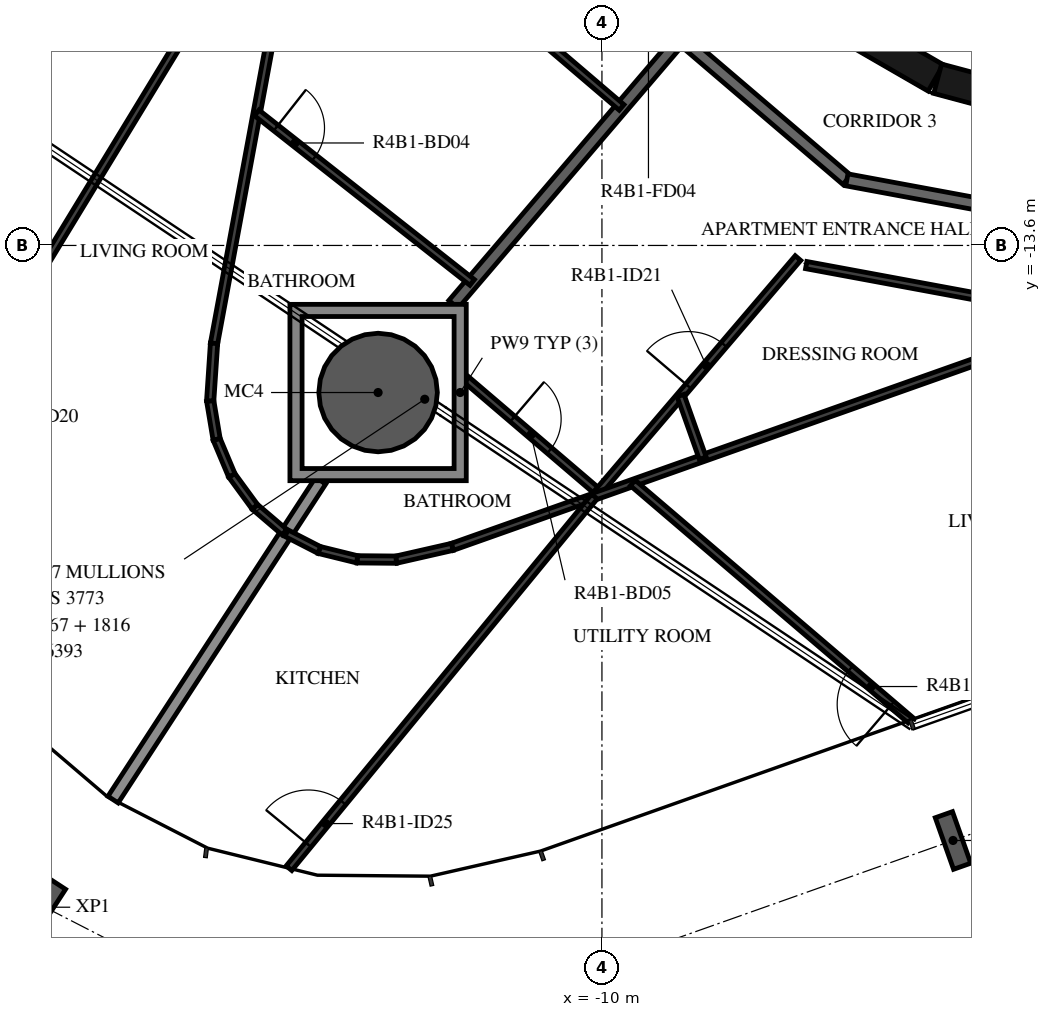
"""IFC4 building model, lengths in metres.
Left out: names, types, materials, properties, quantities, classifications, styles, units other than length and angle.
Written with IfcOpenShell. Run it as: python <this file> out.ifc"""

import sys

from ifc_helpers import new_model, si_unit, direction, frame, frame_2d, origin, origin_2d, place, context, subcontext, project, spatial, polyline, rectangle, hollow_circle, i_section, outline, extrude, element, fill, save


model = new_model("IFC4")
c1 = context("Model", 3, precision=1e-05, world=origin(), true_north=direction((0.0, 1.0)))
c2 = subcontext(c1, "Body", "Model", "MODEL_VIEW")
j1 = project(units=[si_unit("LENGTHUNIT", "METRE"), si_unit("PLANEANGLEUNIT", "RADIAN")], contexts=[c1])
p1 = place(None, origin())
s1 = spatial("IfcSite", under=j1, at=p1, CompositionType="ELEMENT")
p2 = place(p1, origin())
s2 = spatial("IfcBuilding", under=s1, at=p2, CompositionType="ELEMENT")
p3 = place(p2, frame((0.0, 0.0, 162.2)))
s3 = spatial("IfcBuildingStorey", under=s2, at=p3, CompositionType="ELEMENT", Elevation=162.2)
p4 = place(p3, frame((-13.681, -16.019, -0.38), z_axis=(0.0, 0.0, 1.0), x_axis=(1.0, 0.0, 0.0)))
e1 = element("IfcColumn", 1, at=p4, inside=s3, PredefinedType="COLUMN", context=c2, shape_type="SweptSolid", body=[
    extrude(hollow_circle(Radius=0.975, WallThickness=0.045, at=origin_2d()), origin(), (0.0, 0.0, 1.0), 3.5),
])
for number, where, z_axis, x_axis in (
    (2, (-19.192, -24.483, -0.38), (0.0, 0.0, 1.0), (-0.838, 0.546, 0.0)),
    (3, (-4.226, -23.385, -0.38), (0.0, 0.0, 1.0), (-0.943, -0.334, 0.0)),
):
    element("IfcColumn", number, at=place(p3, frame(where, z_axis=z_axis, x_axis=x_axis)), inside=s3, PredefinedType="COLUMN", context=c2, shape_type="SweptSolid", body=[
        extrude(i_section(OverallWidth=0.3, OverallDepth=0.9, WebThickness=0.019, FlangeThickness=0.035, FilletRadius=0.03, at=origin_2d()), origin(), (0.0, 0.0, 1.0), 3.5),
    ])
for number, where, z_axis, x_axis in (
    (4, (-7.137, -9.329, 0.0), (0.0, 0.0, 1.0), (0.866, -0.5, 0.0)),
    (5, (-4.479, -10.858, 0.0), (0.0, 0.0, 1.0), (0.966, -0.259, 0.0)),
):
    element("IfcWall", number, at=place(p3, frame(where, z_axis=z_axis, x_axis=x_axis)), inside=s3, PredefinedType="SHEAR", context=c2, shape_type="SweptSolid", body=[
        extrude(rectangle(XDim=3.033, YDim=0.5, at=frame_2d((1.516, 0.0))), origin(), (0.0, 0.0, 1.0), 3.12),
    ])
p5 = place(p3, frame((-11.433, -7.858, 0.0), z_axis=(0.0, 0.0, 1.0), x_axis=(0.760412154545, -0.649440801937, 0.0)))
e6 = element("IfcWall", 6, at=p5, inside=s3, PredefinedType="STANDARD", context=c2, shape_type="SweptSolid", body=[
    extrude(rectangle(XDim=7.181, YDim=0.2, at=frame_2d((3.59, 0.0))), origin(), (0.0, 0.0, 1.0), 3.12),
])
p6 = place(p5, frame((2.39, 0.0, 0.0)))
e7 = element("IfcOpeningElement", 7, at=p6, cuts=e6, PredefinedType="OPENING", context=c2, shape_type="SweptSolid", body=[
    extrude(rectangle(XDim=1.0, YDim=2.1, at=frame_2d((0.5, 1.05))), frame((0.0, 0.11, 0.0), z_axis=(0.0, -1.0, 0.0), x_axis=(1.0, 0.0, 0.0)), (0.0, 0.0, 1.0), 0.22),
])
p7 = place(p3, frame((-5.972, -12.521, 0.0), z_axis=(0.0, 0.0, 1.0), x_axis=(0.983256068163, -0.18222926335, 0.0)))
e8 = element("IfcWall", 8, at=p7, inside=s3, PredefinedType="STANDARD", context=c2, shape_type="SweptSolid", body=[
    extrude(rectangle(XDim=7.181, YDim=0.2, at=frame_2d((3.59, 0.0))), origin(), (0.0, 0.0, 1.0), 3.12),
])
p8 = place(p7, frame((4.6, 0.0, 0.0)))
e9 = element("IfcOpeningElement", 9, at=p8, cuts=e8, PredefinedType="OPENING", context=c2, shape_type="SweptSolid", body=[
    extrude(rectangle(XDim=1.0, YDim=2.1, at=frame_2d((0.5, 1.05))), frame((0.0, 0.11, 0.0), z_axis=(0.0, -1.0, 0.0), x_axis=(1.0, 0.0, 0.0)), (0.0, 0.0, 1.0), 0.22),
])
p9 = place(p3, frame((-12.441, -14.569, 0.0), z_axis=(0.0, 0.0, 1.0), x_axis=(0.649446013128, 0.760407703822, 0.0)))
e10 = element("IfcWall", 10, at=p9, inside=s3, PredefinedType="STANDARD", context=c2, shape_type="SweptSolid", body=[
    extrude(rectangle(XDim=5.758, YDim=0.2, at=frame_2d((2.879, 0.0))), origin(), (0.0, 0.0, 1.0), 3.12),
])
p10 = place(p3, frame((-18.04, -22.713, 0.0), z_axis=(0.0, 0.0, 1.0), x_axis=(0.545628572271, 0.838027124335, 0.0)))
e11 = element("IfcWall", 11, at=p10, inside=s3, PredefinedType="STANDARD", context=c2, shape_type="SweptSolid", body=[
    extrude(rectangle(XDim=6.258, YDim=0.2, at=frame_2d((3.129, 0.0))), origin(), (0.0, 0.0, 1.0), 2.73),
])
p11 = place(p3, frame((-12.713, -8.737, 0.0), z_axis=(0.0, 0.0, 1.0), x_axis=(0.760420863476, -0.649430604754, 0.0)))
e12 = element("IfcWall", 12, at=p11, inside=s3, PredefinedType="PARTITIONING", context=c2, shape_type="SweptSolid", body=[
    extrude(rectangle(XDim=3.992, YDim=0.12, at=frame_2d((1.996, 0.0))), origin(), (0.0, 0.0, 1.0), 3.12),
])
p12 = place(p3, frame((-20.849, -10.792, 0.0), z_axis=(0.0, 0.0, 1.0), x_axis=(0.848835001009, 0.528657867682, 0.0)))
e13 = element("IfcWall", 13, at=p12, inside=s3, PredefinedType="PARTITIONING", context=c2, shape_type="SweptSolid", body=[
    extrude(rectangle(XDim=6.778, YDim=0.12, at=frame_2d((3.389, 0.0))), origin(), (0.0, 0.0, 1.0), 3.12),
])
p13 = place(p3, frame((-21.461, -17.671, 0.0), z_axis=(0.0, 0.0, 1.0), x_axis=(0.519791999186, 0.854292852353, 0.0)))
e14 = element("IfcWall", 14, at=p13, inside=s3, PredefinedType="PARTITIONING", context=c2, shape_type="SweptSolid", body=[
    extrude(rectangle(XDim=12.247, YDim=0.12, at=frame_2d((6.124, 0.0))), origin(), (0.0, 0.0, 1.0), 3.12),
])
p14 = place(p13, frame((1.0, 0.0, 0.0)))
e15 = element("IfcOpeningElement", 15, at=p14, cuts=e14, PredefinedType="OPENING", context=c2, shape_type="SweptSolid", body=[
    extrude(rectangle(XDim=0.9, YDim=2.1, at=frame_2d((0.45, 1.05))), frame((0.0, 0.07, 0.0), z_axis=(0.0, -1.0, 0.0), x_axis=(1.0, 0.0, 0.0)), (0.0, 0.0, 1.0), 0.14),
])
p15 = place(p3, frame((-14.882, -7.133, 0.0), z_axis=(0.0, 0.0, 1.0), x_axis=(-0.182231858218, -0.983255587246, 0.0)))
e16 = element("IfcWall", 16, at=p15, inside=s3, PredefinedType="PARTITIONING", context=c2, shape_type="SweptSolid", body=[
    extrude(rectangle(XDim=8.215, YDim=0.12, at=frame_2d((4.107, 0.0))), origin(), (0.0, 0.0, 1.0), 3.12),
])
p16 = place(p15, frame((1.9, 0.0, 0.0)))
e17 = element("IfcOpeningElement", 17, at=p16, cuts=e16, PredefinedType="OPENING", context=c2, shape_type="SweptSolid", body=[
    extrude(rectangle(XDim=0.9, YDim=2.1, at=frame_2d((0.45, 1.05))), frame((0.0, 0.07, 0.0), z_axis=(0.0, -1.0, 0.0), x_axis=(1.0, 0.0, 0.0)), (0.0, 0.0, 1.0), 0.14),
])
p17 = place(p3, frame((-15.677, -11.42, 0.0), z_axis=(0.0, 0.0, 1.0), x_axis=(0.785821888461, -0.618452875824, 0.0)))
e18 = element("IfcWall", 18, at=p17, inside=s3, PredefinedType="PARTITIONING", context=c2, shape_type="SweptSolid", body=[
    extrude(rectangle(XDim=4.507, YDim=0.12, at=frame_2d((2.254, 0.0))), origin(), (0.0, 0.0, 1.0), 3.12),
])
p18 = place(p17, frame((0.4, 0.0, 0.0)))
e19 = element("IfcOpeningElement", 19, at=p18, cuts=e18, PredefinedType="OPENING", context=c2, shape_type="SweptSolid", body=[
    extrude(rectangle(XDim=0.8, YDim=2.1, at=frame_2d((0.4, 1.05))), frame((0.0, 0.07, 0.0), z_axis=(0.0, -1.0, 0.0), x_axis=(1.0, 0.0, 0.0)), (0.0, 0.0, 1.0), 0.14),
])
for number, where, z_axis, x_axis in (
    (20, (-15.22, -18.315, 0.0), (0.0, 0.0, 1.0), (-0.76, 0.65, 0.0)),
    (21, (-15.708, -17.898, 0.0), (0.0, 0.0, 1.0), (-0.59, 0.807, 0.0)),
):
    element("IfcWall", number, at=place(p3, frame(where, z_axis=z_axis, x_axis=x_axis)), inside=s3, PredefinedType="PARTITIONING", context=c2, shape_type="SweptSolid", body=[
        extrude(rectangle(XDim=0.642, YDim=0.12, at=frame_2d((0.321, 0.0))), origin(), (0.0, 0.0, 1.0), 3.12),
    ])
p19 = place(p3, frame((-16.087, -17.38, 0.0), z_axis=(0.0, 0.0, 1.0), x_axis=(-0.387852998664, 0.921721243884, 0.0)))
e22 = element("IfcWall", 22, at=p19, inside=s3, PredefinedType="PARTITIONING", context=c2, shape_type="SweptSolid", body=[
    extrude(rectangle(XDim=0.642, YDim=0.12, at=frame_2d((0.321, 0.0))), origin(), (0.0, 0.0, 1.0), 3.12),
])
p20 = place(p3, frame((-16.336, -16.788, 0.0), z_axis=(0.0, 0.0, 1.0), x_axis=(-0.165077433319, 0.986280609669, 0.0)))
e23 = element("IfcWall", 23, at=p20, inside=s3, PredefinedType="PARTITIONING", context=c2, shape_type="SweptSolid", body=[
    extrude(rectangle(XDim=0.642, YDim=0.12, at=frame_2d((0.321, 0.0))), origin(), (0.0, 0.0, 1.0), 3.12),
])
p21 = place(p3, frame((-16.442, -16.155, 0.0), z_axis=(0.0, 0.0, 1.0), x_axis=(0.066775688713, 0.997768012815, 0.0)))
e24 = element("IfcWall", 24, at=p21, inside=s3, PredefinedType="PARTITIONING", context=c2, shape_type="SweptSolid", body=[
    extrude(rectangle(XDim=0.947, YDim=0.12, at=frame_2d((0.474, 0.0))), origin(), (0.0, 0.0, 1.0), 3.12),
])
p22 = place(p3, frame((-12.231, -15.804, 0.0), z_axis=(0.0, 0.0, 1.0), x_axis=(0.760403625387, -0.649450788357, 0.0)))
e25 = element("IfcWall", 25, at=p22, inside=s3, PredefinedType="PARTITIONING", context=c2, shape_type="SweptSolid", body=[
    extrude(rectangle(XDim=2.852, YDim=0.12, at=frame_2d((1.426, 0.0))), origin(), (0.0, 0.0, 1.0), 3.12),
])
p23 = place(p22, frame((1.0, 0.0, 0.0)))
e26 = element("IfcOpeningElement", 26, at=p23, cuts=e25, PredefinedType="OPENING", context=c2, shape_type="SweptSolid", body=[
    extrude(rectangle(XDim=0.8, YDim=2.1, at=frame_2d((0.4, 1.05))), frame((0.0, 0.07, 0.0), z_axis=(0.0, -1.0, 0.0), x_axis=(1.0, 0.0, 0.0)), (0.0, 0.0, 1.0), 0.14),
])
p24 = place(p3, frame((-10.063, -17.656, 0.0), z_axis=(0.0, 0.0, 1.0), x_axis=(0.649451567172, 0.760402960211, 0.0)))
e27 = element("IfcWall", 27, at=p24, inside=s3, PredefinedType="PARTITIONING", context=c2, shape_type="SweptSolid", body=[
    extrude(rectangle(XDim=5.061, YDim=0.12, at=frame_2d((2.531, 0.0))), origin(), (0.0, 0.0, 1.0), 3.12),
])
p25 = place(p24, frame((2.288, 0.0, 0.0)))
e28 = element("IfcOpeningElement", 28, at=p25, cuts=e27, PredefinedType="OPENING", context=c2, shape_type="SweptSolid", body=[
    extrude(rectangle(XDim=0.9, YDim=2.1, at=frame_2d((0.45, 1.05))), frame((0.0, 0.07, 0.0), z_axis=(0.0, -1.0, 0.0), x_axis=(1.0, 0.0, 0.0)), (0.0, 0.0, 1.0), 0.14),
])
p26 = place(p3, frame((-6.641, -13.923, 0.0), z_axis=(0.0, 0.0, 1.0), x_axis=(0.983250157272, -0.182261153912, 0.0)))
e29 = element("IfcWall", 29, at=p26, inside=s3, PredefinedType="PARTITIONING", context=c2, shape_type="SweptSolid", body=[
    extrude(rectangle(XDim=7.985, YDim=0.12, at=frame_2d((3.992, 0.0))), origin(), (0.0, 0.0, 1.0), 3.12),
])
p27 = place(p26, frame((5.051, 0.0, 0.0)))
e30 = element("IfcOpeningElement", 30, at=p27, cuts=e29, PredefinedType="OPENING", context=c2, shape_type="SweptSolid", body=[
    extrude(rectangle(XDim=0.9, YDim=2.1, at=frame_2d((0.45, 1.05))), frame((0.0, 0.07, 0.0), z_axis=(0.0, -1.0, 0.0), x_axis=(1.0, 0.0, 0.0)), (0.0, 0.0, 1.0), 0.14),
])
p28 = place(p3, frame((-1.871, -14.807, 0.0), z_axis=(0.0, 0.0, 1.0), x_axis=(-0.942640759962, -0.333808923874, 0.0)))
e31 = element("IfcWall", 31, at=p28, inside=s3, PredefinedType="PARTITIONING", context=c2, shape_type="SweptSolid", body=[
    extrude(rectangle(XDim=11.234, YDim=0.12, at=frame_2d((5.617, 0.0))), origin(), (0.0, 0.0, 1.0), 3.12),
])
p29 = place(p3, frame((-12.461, -18.557, 0.0), z_axis=(0.0, 0.0, 1.0), x_axis=(-0.975039040601, -0.222033486897, 0.0)))
e32 = element("IfcWall", 32, at=p29, inside=s3, PredefinedType="PARTITIONING", context=c2, shape_type="SweptSolid", body=[
    extrude(rectangle(XDim=0.947, YDim=0.12, at=frame_2d((0.473, 0.0))), origin(), (0.0, 0.0, 1.0), 3.12),
])
p30 = place(p3, frame((-13.384, -18.767, 0.0), z_axis=(0.0, 0.0, 1.0), x_axis=(-0.999965015064, 0.008364726362, 0.0)))
e33 = element("IfcWall", 33, at=p30, inside=s3, PredefinedType="PARTITIONING", context=c2, shape_type="SweptSolid", body=[
    extrude(rectangle(XDim=0.642, YDim=0.12, at=frame_2d((0.321, 0.0))), origin(), (0.0, 0.0, 1.0), 3.12),
])
p31 = place(p3, frame((-14.026, -18.762, 0.0), z_axis=(0.0, 0.0, 1.0), x_axis=(-0.970964611728, 0.239223165208, 0.0)))
e34 = element("IfcWall", 34, at=p31, inside=s3, PredefinedType="PARTITIONING", context=c2, shape_type="SweptSolid", body=[
    extrude(rectangle(XDim=0.642, YDim=0.12, at=frame_2d((0.321, 0.0))), origin(), (0.0, 0.0, 1.0), 3.12),
])
p32 = place(p3, frame((-14.649, -18.608, 0.0), z_axis=(0.0, 0.0, 1.0), x_axis=(-0.889695551631, 0.456554296232, 0.0)))
e35 = element("IfcWall", 35, at=p32, inside=s3, PredefinedType="PARTITIONING", context=c2, shape_type="SweptSolid", body=[
    extrude(rectangle(XDim=0.605, YDim=0.12, at=frame_2d((0.302, 0.0))), origin(), (0.0, 0.0, 1.0), 3.12),
])
p33 = place(p3, frame((-15.146, -23.841, 0.0), z_axis=(0.0, 0.0, 1.0), x_axis=(0.634970373647, 0.772536487547, 0.0)))
e36 = element("IfcWall", 36, at=p33, inside=s3, PredefinedType="PARTITIONING", context=c2, shape_type="SweptSolid", body=[
    extrude(rectangle(XDim=7.912, YDim=0.12, at=frame_2d((3.956, 0.0))), origin(), (0.0, 0.0, 1.0), 3.12),
])
p34 = place(p33, frame((0.5, 0.0, 0.0)))
e37 = element("IfcOpeningElement", 37, at=p34, cuts=e36, PredefinedType="OPENING", context=c2, shape_type="SweptSolid", body=[
    extrude(rectangle(XDim=0.9, YDim=2.1, at=frame_2d((0.45, 1.05))), frame((0.0, 0.07, 0.0), z_axis=(0.0, -1.0, 0.0), x_axis=(1.0, 0.0, 0.0)), (0.0, 0.0, 1.0), 0.14),
])
p35 = place(p3, frame((-8.342, -17.098, 0.0), z_axis=(0.0, 0.0, 1.0), x_axis=(-0.333801646268, 0.942643337084, 0.0)))
e38 = element("IfcWall", 38, at=p35, inside=s3, PredefinedType="PARTITIONING", context=c2, shape_type="SweptSolid", body=[
    extrude(rectangle(XDim=1.093, YDim=0.12, at=frame_2d((0.546, 0.0))), origin(), (0.0, 0.0, 1.0), 3.12),
])
p36 = place(p3, frame((-4.927, -21.406, 0.0), z_axis=(0.0, 0.0, 1.0), x_axis=(-0.760409236665, 0.649444218385, 0.0)))
e39 = element("IfcWall", 39, at=p36, inside=s3, PredefinedType="PARTITIONING", context=c2, shape_type="SweptSolid", body=[
    extrude(rectangle(XDim=6.004, YDim=0.12, at=frame_2d((3.002, 0.0))), origin(), (0.0, 0.0, 1.0), 3.12),
])
p37 = place(p36, frame((0.4, 0.0, 0.0)))
e40 = element("IfcOpeningElement", 40, at=p37, cuts=e39, PredefinedType="OPENING", context=c2, shape_type="SweptSolid", body=[
    extrude(rectangle(XDim=0.9, YDim=2.1, at=frame_2d((0.45, 1.05))), frame((0.0, 0.07, 0.0), z_axis=(0.0, -1.0, 0.0), x_axis=(1.0, 0.0, 0.0)), (0.0, 0.0, 1.0), 0.14),
])
p38 = place(p3, origin())
e41 = element("IfcWall", 41, at=p38, inside=s3, PredefinedType="STANDARD", context=c2, shape_type="SweptSolid", body=[
    extrude(outline(polyline([(-12.231, -14.569), (-12.231, -17.469), (-15.131, -17.469), (-15.131, -14.569), (-12.231, -14.569)]), holes=[polyline([(-14.931, -17.269), (-12.431, -17.269), (-12.431, -14.769), (-14.931, -14.769), (-14.931, -17.269)])]), origin(), (0.0, 0.0, 1.0), 3.12),
])
p39 = place(p18, origin())
e42 = element("IfcDoor", 42, at=p39, inside=s3, OperationType="SINGLE_SWING_RIGHT", PredefinedType="DOOR", context=c2, shape_type="SweptSolid", body=[
    extrude(rectangle(XDim=0.8, YDim=2.1, at=frame_2d((0.4, 1.05))), frame((0.0, 0.025, 0.0), z_axis=(0.0, -1.0, 0.0), x_axis=(1.0, 0.0, 0.0)), (0.0, 0.0, 1.0), 0.05),
])
fill(e19, e42)
p40 = place(p23, origin())
e43 = element("IfcDoor", 43, at=p40, inside=s3, OperationType="SINGLE_SWING_LEFT", PredefinedType="DOOR", context=c2, shape_type="SweptSolid", body=[
    extrude(rectangle(XDim=0.8, YDim=2.1, at=frame_2d((0.4, 1.05))), frame((0.0, 0.025, 0.0), z_axis=(0.0, -1.0, 0.0), x_axis=(1.0, 0.0, 0.0)), (0.0, 0.0, 1.0), 0.05),
])
fill(e26, e43)
p41 = place(p25, origin())
e44 = element("IfcDoor", 44, at=p41, inside=s3, OperationType="SINGLE_SWING_LEFT", PredefinedType="DOOR", context=c2, shape_type="SweptSolid", body=[
    extrude(rectangle(XDim=0.9, YDim=2.1, at=frame_2d((0.45, 1.05))), frame((0.0, 0.025, 0.0), z_axis=(0.0, -1.0, 0.0), x_axis=(1.0, 0.0, 0.0)), (0.0, 0.0, 1.0), 0.05),
])
fill(e28, e44)
p42 = place(p37, origin())
e45 = element("IfcDoor", 45, at=p42, inside=s3, OperationType="SINGLE_SWING_LEFT", PredefinedType="DOOR", context=c2, shape_type="SweptSolid", body=[
    extrude(rectangle(XDim=0.9, YDim=2.1, at=frame_2d((0.45, 1.05))), frame((0.0, 0.025, 0.0), z_axis=(0.0, -1.0, 0.0), x_axis=(1.0, 0.0, 0.0)), (0.0, 0.0, 1.0), 0.05),
])
fill(e40, e45)
p43 = place(p34, origin())
e46 = element("IfcDoor", 46, at=p43, inside=s3, OperationType="SINGLE_SWING_LEFT", PredefinedType="DOOR", context=c2, shape_type="SweptSolid", body=[
    extrude(rectangle(XDim=0.9, YDim=2.1, at=frame_2d((0.45, 1.05))), frame((0.0, 0.025, 0.0), z_axis=(0.0, -1.0, 0.0), x_axis=(1.0, 0.0, 0.0)), (0.0, 0.0, 1.0), 0.05),
])
fill(e37, e46)
save(model, sys.argv[1])
